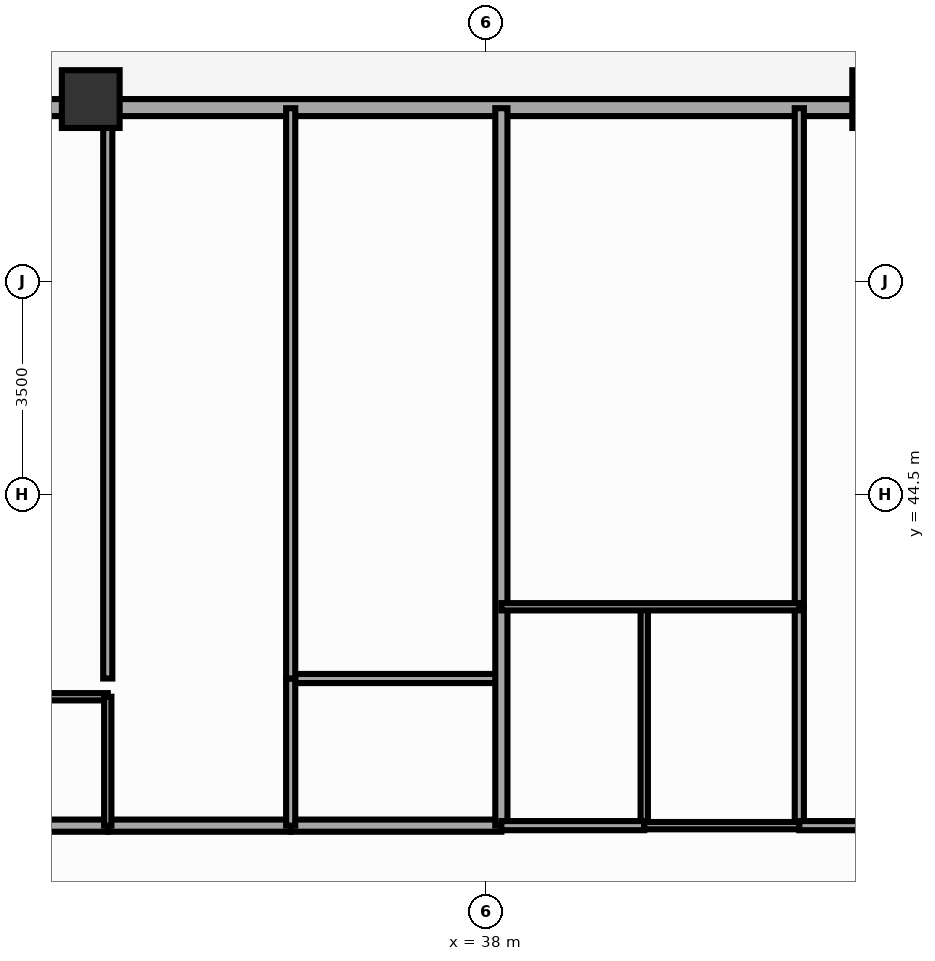
"""IFC4 building model, lengths in metres.
Left out: names, types, materials, properties, quantities, classifications, styles, units other than length and angle.
Written with IfcOpenShell. Run it as: python <this file> out.ifc"""

import sys

from ifc_helpers import new_model, si_unit, direction, frame, frame_2d, origin, origin_2d, place, context, subcontext, project, spatial, rectangle, extrude, source, transform, mapped, element, fill, save


model = new_model("IFC4")
c1 = context("Model", 3, precision=1e-05, world=origin(), true_north=direction((0.0, 1.0)))
c2 = subcontext(c1, "Body", "Model", "MODEL_VIEW")
j1 = project(units=[si_unit("LENGTHUNIT", "METRE"), si_unit("PLANEANGLEUNIT", "RADIAN")], contexts=[c1])
p1 = place(None, origin())
s1 = spatial("IfcSite", under=j1, at=p1, CompositionType="ELEMENT")
p2 = place(p1, origin())
s2 = spatial("IfcBuilding", under=s1, at=p2, CompositionType="ELEMENT")
p3 = place(p2, frame((0.0, 0.0, 74.35)))
s3 = spatial("IfcBuildingStorey", under=s2, at=p3, CompositionType="ELEMENT", Elevation=74.35)
m1 = source(origin(), c2, "Body", "SweptSolid", [
    extrude(rectangle(XDim=0.95, YDim=0.95, at=origin_2d()), origin(), (0.0, 0.0, 1.0), 3.5),
])
for number, where, z_axis, x_axis in (
    (1, (44.5, 51.0, 0.0), (0.0, 0.0, 1.0), (1.0, 0.0, 0.0)),
    (2, (31.5, 51.0, 0.0), (0.0, 0.0, 1.0), (1.0, 0.0, 0.0)),
):
    element("IfcColumn", number, at=place(p3, frame(where, z_axis=z_axis, x_axis=x_axis)), inside=s3, PredefinedType="COLUMN", context=c2, shape_type="MappedRepresentation", body=[
        mapped(m1, transform((0.0, 0.0, 0.0), scale=1.0)),
    ])
p4 = place(p3, frame((16.2, 50.86, 0.0), z_axis=(0.0, 0.0, 1.0), x_axis=(1.0, 0.0, 0.0)))
e3 = element("IfcWall", 3, at=p4, inside=s3, PredefinedType="SOLIDWALL", context=c2, shape_type="SweptSolid", body=[
    extrude(rectangle(XDim=43.6, YDim=0.28, at=frame_2d((21.8, 0.0))), origin(), (0.0, 0.0, 1.0), 2.78),
])
p5 = place(p4, frame((0.722, 0.0, 0.85)))
e4 = element("IfcOpeningElement", 4, at=p5, cuts=e3, PredefinedType="OPENING", context=c2, shape_type="SweptSolid", body=[
    extrude(rectangle(XDim=1.2, YDim=1.5, at=frame_2d((0.6, 0.75))), frame((0.0, 0.152, 0.0), z_axis=(0.0, -1.0, 0.0), x_axis=(1.0, 0.0, 0.0)), (0.0, 0.0, 1.0), 0.304),
])
p6 = place(p4, frame((3.88, 0.0, 0.85)))
e5 = element("IfcOpeningElement", 5, at=p6, cuts=e3, PredefinedType="OPENING", context=c2, shape_type="SweptSolid", body=[
    extrude(rectangle(XDim=1.8, YDim=1.65, at=frame_2d((0.9, 0.825))), frame((0.0, 0.152, 0.0), z_axis=(0.0, -1.0, 0.0), x_axis=(1.0, 0.0, 0.0)), (0.0, 0.0, 1.0), 0.304),
])
p7 = place(p4, frame((8.811, 0.0, 0.85)))
e6 = element("IfcOpeningElement", 6, at=p7, cuts=e3, PredefinedType="OPENING", context=c2, shape_type="SweptSolid", body=[
    extrude(rectangle(XDim=1.8, YDim=1.65, at=frame_2d((0.9, 0.825))), frame((0.0, 0.152, 0.0), z_axis=(0.0, -1.0, 0.0), x_axis=(1.0, 0.0, 0.0)), (0.0, 0.0, 1.0), 0.304),
])
p8 = place(p4, frame((12.688, 0.0, 0.85)))
e7 = element("IfcOpeningElement", 7, at=p8, cuts=e3, PredefinedType="OPENING", context=c2, shape_type="SweptSolid", body=[
    extrude(rectangle(XDim=1.8, YDim=1.65, at=frame_2d((0.9, 0.825))), frame((0.0, 0.152, 0.0), z_axis=(0.0, -1.0, 0.0), x_axis=(1.0, 0.0, 0.0)), (0.0, 0.0, 1.0), 0.304),
])
p9 = place(p4, frame((16.202, 0.0, 0.85)))
e8 = element("IfcOpeningElement", 8, at=p9, cuts=e3, PredefinedType="OPENING", context=c2, shape_type="SweptSolid", body=[
    extrude(rectangle(XDim=1.8, YDim=1.65, at=frame_2d((0.9, 0.825))), frame((0.0, 0.152, 0.0), z_axis=(0.0, -1.0, 0.0), x_axis=(1.0, 0.0, 0.0)), (0.0, 0.0, 1.0), 0.304),
])
p10 = place(p4, frame((19.421, 0.0, 0.85)))
e9 = element("IfcOpeningElement", 9, at=p10, cuts=e3, PredefinedType="OPENING", context=c2, shape_type="SweptSolid", body=[
    extrude(rectangle(XDim=1.8, YDim=1.65, at=frame_2d((0.9, 0.825))), frame((0.0, 0.152, 0.0), z_axis=(0.0, -1.0, 0.0), x_axis=(1.0, 0.0, 0.0)), (0.0, 0.0, 1.0), 0.304),
])
p11 = place(p4, frame((23.953, 0.0, 0.0)))
e10 = element("IfcOpeningElement", 10, at=p11, cuts=e3, PredefinedType="OPENING", context=c2, shape_type="SweptSolid", body=[
    extrude(rectangle(XDim=1.1, YDim=2.15, at=frame_2d((0.55, 1.075))), frame((0.0, 0.152, 0.0), z_axis=(0.0, -1.0, 0.0), x_axis=(1.0, 0.0, 0.0)), (0.0, 0.0, 1.0), 0.304),
])
p12 = place(p4, frame((29.776, 0.0, 0.85)))
e11 = element("IfcOpeningElement", 11, at=p12, cuts=e3, PredefinedType="OPENING", context=c2, shape_type="SweptSolid", body=[
    extrude(rectangle(XDim=1.8, YDim=1.65, at=frame_2d((0.9, 0.825))), frame((0.0, 0.152, 0.0), z_axis=(0.0, -1.0, 0.0), x_axis=(1.0, 0.0, 0.0)), (0.0, 0.0, 1.0), 0.304),
])
p13 = place(p4, frame((33.226, 0.0, 0.85)))
e12 = element("IfcOpeningElement", 12, at=p13, cuts=e3, PredefinedType="OPENING", context=c2, shape_type="SweptSolid", body=[
    extrude(rectangle(XDim=1.8, YDim=1.65, at=frame_2d((0.9, 0.825))), frame((0.0, 0.152, 0.0), z_axis=(0.0, -1.0, 0.0), x_axis=(1.0, 0.0, 0.0)), (0.0, 0.0, 1.0), 0.304),
])
p14 = place(p4, frame((36.858, 0.0, 0.85)))
e13 = element("IfcOpeningElement", 13, at=p14, cuts=e3, PredefinedType="OPENING", context=c2, shape_type="SweptSolid", body=[
    extrude(rectangle(XDim=1.8, YDim=1.65, at=frame_2d((0.9, 0.825))), frame((0.0, 0.152, 0.0), z_axis=(0.0, -1.0, 0.0), x_axis=(1.0, 0.0, 0.0)), (0.0, 0.0, 1.0), 0.304),
])
p15 = place(p4, frame((40.743, 0.0, 0.85)))
e14 = element("IfcOpeningElement", 14, at=p15, cuts=e3, PredefinedType="OPENING", context=c2, shape_type="SweptSolid", body=[
    extrude(rectangle(XDim=1.8, YDim=1.65, at=frame_2d((0.9, 0.825))), frame((0.0, 0.152, 0.0), z_axis=(0.0, -1.0, 0.0), x_axis=(1.0, 0.0, 0.0)), (0.0, 0.0, 1.0), 0.304),
])
p16 = place(p3, frame((28.392, 39.05, 0.0), z_axis=(0.0, 0.0, 1.0), x_axis=(1.0, 0.0, 0.0)))
e15 = element("IfcWall", 15, at=p16, inside=s3, PredefinedType="PARTITIONING", context=c2, shape_type="SweptSolid", body=[
    extrude(rectangle(XDim=3.388, YDim=0.2, at=frame_2d((1.694, 0.0))), origin(), (0.0, 0.0, 1.0), 3.29),
])
p17 = place(p3, frame((31.78, 39.05, 0.0), z_axis=(0.0, 0.0, 1.0), x_axis=(1.0, 0.0, 0.0)))
e16 = element("IfcWall", 16, at=p17, inside=s3, PredefinedType="PARTITIONING", context=c2, shape_type="SweptSolid", body=[
    extrude(rectangle(XDim=3.008, YDim=0.2, at=frame_2d((1.504, 0.0))), origin(), (0.0, 0.0, 1.0), 3.29),
])
p18 = place(p17, frame((1.004, 0.0, 0.0)))
e17 = element("IfcOpeningElement", 17, at=p18, cuts=e16, PredefinedType="OPENING", context=c2, shape_type="SweptSolid", body=[
    extrude(rectangle(XDim=1.0, YDim=2.15, at=frame_2d((0.5, 1.075))), frame((0.0, 0.112, 0.0), z_axis=(0.0, -1.0, 0.0), x_axis=(1.0, 0.0, 0.0)), (0.0, 0.0, 1.0), 0.224),
])
p19 = place(p3, frame((34.788, 39.05, 0.0), z_axis=(0.0, 0.0, 1.0), x_axis=(1.0, 0.0, 0.0)))
e18 = element("IfcWall", 18, at=p19, inside=s3, PredefinedType="PARTITIONING", context=c2, shape_type="SweptSolid", body=[
    extrude(rectangle(XDim=3.465, YDim=0.2, at=frame_2d((1.732, 0.0))), origin(), (0.0, 0.0, 1.0), 3.29),
])
p20 = place(p3, frame((28.392, 41.17, 0.0), z_axis=(0.0, 0.0, 1.0), x_axis=(1.0, 0.0, 0.0)))
e19 = element("IfcWall", 19, at=p20, inside=s3, PredefinedType="PARTITIONING", context=c2, shape_type="SweptSolid", body=[
    extrude(rectangle(XDim=3.388, YDim=0.12, at=frame_2d((1.694, 0.0))), origin(), (0.0, 0.0, 1.0), 3.29),
])
p21 = place(p3, frame((34.788, 41.47, 0.0), z_axis=(0.0, 0.0, 1.0), x_axis=(1.0, 0.0, 0.0)))
e20 = element("IfcWall", 20, at=p21, inside=s3, PredefinedType="PARTITIONING", context=c2, shape_type="SweptSolid", body=[
    extrude(rectangle(XDim=3.465, YDim=0.15, at=frame_2d((1.732, 0.0))), origin(), (0.0, 0.0, 1.0), 3.29),
])
p22 = place(p3, frame((31.78, 39.05, 0.0), z_axis=(0.0, 0.0, 1.0), x_axis=(0.0, 1.0, 0.0)))
e21 = element("IfcWall", 21, at=p22, inside=s3, PredefinedType="PARTITIONING", context=c2, shape_type="SweptSolid", body=[
    extrude(rectangle(XDim=2.12, YDim=0.12, at=frame_2d((1.06, 0.0))), origin(), (0.0, 0.0, 1.0), 3.29),
])
p23 = place(p22, frame((0.635, 0.0, 0.0)))
e22 = element("IfcOpeningElement", 22, at=p23, cuts=e21, PredefinedType="OPENING", context=c2, shape_type="SweptSolid", body=[
    extrude(rectangle(XDim=0.85, YDim=2.05, at=frame_2d((0.425, 1.025))), frame((0.0, 0.072, 0.0), z_axis=(0.0, -1.0, 0.0), x_axis=(1.0, 0.0, 0.0)), (0.0, 0.0, 1.0), 0.144),
])
p24 = place(p3, frame((31.78, 41.47, 0.0), z_axis=(0.0, 0.0, 1.0), x_axis=(0.0, 1.0, 0.0)))
e23 = element("IfcWall", 23, at=p24, inside=s3, PredefinedType="PARTITIONING", context=c2, shape_type="SweptSolid", body=[
    extrude(rectangle(XDim=9.38, YDim=0.15, at=frame_2d((4.69, 0.0))), origin(), (0.0, 0.0, 1.0), 3.29),
])
p25 = place(p24, frame((3.907, 0.0, 0.0)))
e24 = element("IfcOpeningElement", 24, at=p25, cuts=e23, PredefinedType="OPENING", context=c2, shape_type="SweptSolid", body=[
    extrude(rectangle(XDim=0.9, YDim=2.1, at=frame_2d((0.45, 1.05))), frame((0.0, 0.087, 0.0), z_axis=(0.0, -1.0, 0.0), x_axis=(1.0, 0.0, 0.0)), (0.0, 0.0, 1.0), 0.174),
])
p26 = place(p3, frame((34.788, 39.05, 0.0), z_axis=(0.0, 0.0, 1.0), x_axis=(0.0, 1.0, 0.0)))
e25 = element("IfcWall", 25, at=p26, inside=s3, PredefinedType="PARTITIONING", context=c2, shape_type="SweptSolid", body=[
    extrude(rectangle(XDim=2.42, YDim=0.15, at=frame_2d((1.21, 0.0))), origin(), (0.0, 0.0, 1.0), 3.29),
])
p27 = place(p26, frame((0.76, 0.0, 0.0)))
e26 = element("IfcOpeningElement", 26, at=p27, cuts=e25, PredefinedType="OPENING", context=c2, shape_type="SweptSolid", body=[
    extrude(rectangle(XDim=0.9, YDim=2.1, at=frame_2d((0.45, 1.05))), frame((0.0, 0.087, 0.0), z_axis=(0.0, -1.0, 0.0), x_axis=(1.0, 0.0, 0.0)), (0.0, 0.0, 1.0), 0.174),
])
p28 = place(p3, frame((34.788, 41.47, 0.0), z_axis=(0.0, 0.0, 1.0), x_axis=(0.0, 1.0, 0.0)))
e27 = element("IfcWall", 27, at=p28, inside=s3, PredefinedType="PARTITIONING", context=c2, shape_type="SweptSolid", body=[
    extrude(rectangle(XDim=9.38, YDim=0.15, at=frame_2d((4.69, 0.0))), origin(), (0.0, 0.0, 1.0), 3.29),
])
p29 = place(p28, frame((3.907, 0.0, 0.0)))
e28 = element("IfcOpeningElement", 28, at=p29, cuts=e27, PredefinedType="OPENING", context=c2, shape_type="SweptSolid", body=[
    extrude(rectangle(XDim=0.9, YDim=2.1, at=frame_2d((0.45, 1.05))), frame((0.0, 0.087, 0.0), z_axis=(0.0, -1.0, 0.0), x_axis=(1.0, 0.0, 0.0)), (0.0, 0.0, 1.0), 0.174),
])
p30 = place(p3, frame((38.253, 39.05, 0.0), z_axis=(0.0, 0.0, 1.0), x_axis=(0.0, 1.0, 0.0)))
e29 = element("IfcWall", 29, at=p30, inside=s3, PredefinedType="PARTITIONING", context=c2, shape_type="SweptSolid", body=[
    extrude(rectangle(XDim=11.8, YDim=0.2, at=frame_2d((5.9, 0.0))), origin(), (0.0, 0.0, 1.0), 3.29),
])
p31 = place(p3, frame((40.603, 39.05, 0.0), z_axis=(0.0, 0.0, 1.0), x_axis=(0.0, 1.0, 0.0)))
e30 = element("IfcWall", 30, at=p31, inside=s3, PredefinedType="PARTITIONING", context=c2, shape_type="SweptSolid", body=[
    extrude(rectangle(XDim=3.6, YDim=0.12, at=frame_2d((1.8, 0.0))), origin(), (0.0, 0.0, 1.0), 3.29),
])
p32 = place(p3, frame((43.153, 39.05, 0.0), z_axis=(0.0, 0.0, 1.0), x_axis=(0.0, 1.0, 0.0)))
e31 = element("IfcWall", 31, at=p32, inside=s3, PredefinedType="PARTITIONING", context=c2, shape_type="SweptSolid", body=[
    extrude(rectangle(XDim=3.6, YDim=0.15, at=frame_2d((1.8, 0.0))), origin(), (0.0, 0.0, 1.0), 3.29),
])
p33 = place(p3, frame((43.153, 42.65, 0.0), z_axis=(0.0, 0.0, 1.0), x_axis=(0.0, 1.0, 0.0)))
e32 = element("IfcWall", 32, at=p33, inside=s3, PredefinedType="PARTITIONING", context=c2, shape_type="SweptSolid", body=[
    extrude(rectangle(XDim=8.2, YDim=0.15, at=frame_2d((4.1, 0.0))), origin(), (0.0, 0.0, 1.0), 3.29),
])
p34 = place(p33, frame((3.65, 0.0, 0.0)))
e33 = element("IfcOpeningElement", 33, at=p34, cuts=e32, PredefinedType="OPENING", context=c2, shape_type="SweptSolid", body=[
    extrude(rectangle(XDim=0.9, YDim=2.1, at=frame_2d((0.45, 1.05))), frame((0.0, 0.087, 0.0), z_axis=(0.0, -1.0, 0.0), x_axis=(1.0, 0.0, 0.0)), (0.0, 0.0, 1.0), 0.174),
])
p35 = place(p3, frame((38.253, 42.65, 0.0), z_axis=(0.0, 0.0, 1.0), x_axis=(1.0, 0.0, 0.0)))
e34 = element("IfcWall", 34, at=p35, inside=s3, PredefinedType="PARTITIONING", context=c2, shape_type="SweptSolid", body=[
    extrude(rectangle(XDim=4.9, YDim=0.12, at=frame_2d((2.45, 0.0))), origin(), (0.0, 0.0, 1.0), 3.29),
])
p36 = place(p3, frame((38.253, 39.05, 0.0), z_axis=(0.0, 0.0, 1.0), x_axis=(1.0, 0.0, 0.0)))
e35 = element("IfcWall", 35, at=p36, inside=s3, PredefinedType="PARTITIONING", context=c2, shape_type="SweptSolid", body=[
    extrude(rectangle(XDim=2.35, YDim=0.15, at=frame_2d((1.175, 0.0))), origin(), (0.0, 0.0, 1.0), 3.29),
])
p37 = place(p36, frame((0.725, 0.0, 0.0)))
e36 = element("IfcOpeningElement", 36, at=p37, cuts=e35, PredefinedType="OPENING", context=c2, shape_type="SweptSolid", body=[
    extrude(rectangle(XDim=0.9, YDim=2.1, at=frame_2d((0.45, 1.05))), frame((0.0, 0.087, 0.0), z_axis=(0.0, -1.0, 0.0), x_axis=(1.0, 0.0, 0.0)), (0.0, 0.0, 1.0), 0.174),
])
p38 = place(p3, frame((40.603, 39.05, 0.0), z_axis=(0.0, 0.0, 1.0), x_axis=(1.0, 0.0, 0.0)))
e37 = element("IfcWall", 37, at=p38, inside=s3, PredefinedType="PARTITIONING", context=c2, shape_type="SweptSolid", body=[
    extrude(rectangle(XDim=2.55, YDim=0.12, at=frame_2d((1.275, 0.0))), origin(), (0.0, 0.0, 1.0), 3.29),
])
p39 = place(p38, frame((0.775, 0.0, 0.0)))
e38 = element("IfcOpeningElement", 38, at=p39, cuts=e37, PredefinedType="OPENING", context=c2, shape_type="SweptSolid", body=[
    extrude(rectangle(XDim=1.0, YDim=2.1, at=frame_2d((0.5, 1.05))), frame((0.0, 0.072, 0.0), z_axis=(0.0, -1.0, 0.0), x_axis=(1.0, 0.0, 0.0)), (0.0, 0.0, 1.0), 0.144),
])
p40 = place(p3, frame((43.153, 39.05, 0.0), z_axis=(0.0, 0.0, 1.0), x_axis=(1.0, 0.0, 0.0)))
e39 = element("IfcWall", 39, at=p40, inside=s3, PredefinedType="PARTITIONING", context=c2, shape_type="SweptSolid", body=[
    extrude(rectangle(XDim=5.783, YDim=0.15, at=frame_2d((2.892, 0.0))), origin(), (0.0, 0.0, 1.0), 3.29),
])
p41 = place(p40, frame((2.515, 0.0, 0.0)))
e40 = element("IfcOpeningElement", 40, at=p41, cuts=e39, PredefinedType="OPENING", context=c2, shape_type="SweptSolid", body=[
    extrude(rectangle(XDim=1.1, YDim=2.15, at=frame_2d((0.55, 1.075))), frame((0.0, 0.087, 0.0), z_axis=(0.0, -1.0, 0.0), x_axis=(1.0, 0.0, 0.0)), (0.0, 0.0, 1.0), 0.174),
])
m2 = source(origin(), c2, "Body", "SweptSolid", [
    extrude(rectangle(XDim=1.8, YDim=1.65, at=frame_2d((0.9, 0.825))), frame((0.0, 0.03, 0.0), z_axis=(0.0, -1.0, 0.0), x_axis=(1.0, 0.0, 0.0)), (0.0, 0.0, 1.0), 0.06),
])
p42 = place(p9, origin())
e41 = element("IfcWindow", 41, at=p42, inside=s3, PartitioningType="SINGLE_PANEL", PredefinedType="WINDOW", context=c2, shape_type="MappedRepresentation", body=[
    mapped(m2, transform((0.0, 0.0, 0.0), scale=1.0)),
])
fill(e8, e41)
p43 = place(p10, origin())
e42 = element("IfcWindow", 42, at=p43, inside=s3, PartitioningType="SINGLE_PANEL", PredefinedType="WINDOW", context=c2, shape_type="MappedRepresentation", body=[
    mapped(m2, transform((0.0, 0.0, 0.0), scale=1.0)),
])
fill(e9, e42)
m3 = source(origin(), c2, "Body", "SweptSolid", [
    extrude(rectangle(XDim=1.1, YDim=2.15, at=frame_2d((0.55, 1.075))), frame((0.0, 0.025, 0.0), z_axis=(0.0, -1.0, 0.0), x_axis=(1.0, 0.0, 0.0)), (0.0, 0.0, 1.0), 0.05),
])
p44 = place(p11, origin())
e43 = element("IfcDoor", 43, at=p44, inside=s3, OperationType="SINGLE_SWING_LEFT", PredefinedType="DOOR", context=c2, shape_type="MappedRepresentation", body=[
    mapped(m3, transform((0.0, 0.0, 0.0), scale=1.0)),
])
fill(e10, e43)
m4 = source(origin(), c2, "Body", "SweptSolid", [
    extrude(rectangle(XDim=1.0, YDim=2.15, at=frame_2d((0.5, 1.075))), frame((0.0, 0.025, 0.0), z_axis=(0.0, -1.0, 0.0), x_axis=(1.0, 0.0, 0.0)), (0.0, 0.0, 1.0), 0.05),
])
p45 = place(p18, origin())
e44 = element("IfcDoor", 44, at=p45, inside=s3, OperationType="SINGLE_SWING_LEFT", PredefinedType="DOOR", context=c2, shape_type="MappedRepresentation", body=[
    mapped(m4, transform((0.0, 0.0, 0.0), scale=1.0)),
])
fill(e17, e44)
m5 = source(origin(), c2, "Body", "SweptSolid", [
    extrude(rectangle(XDim=0.85, YDim=2.05, at=frame_2d((0.425, 1.025))), frame((0.0, 0.025, 0.0), z_axis=(0.0, -1.0, 0.0), x_axis=(1.0, 0.0, 0.0)), (0.0, 0.0, 1.0), 0.05),
])
p46 = place(p23, origin())
e45 = element("IfcDoor", 45, at=p46, inside=s3, OperationType="SINGLE_SWING_RIGHT", PredefinedType="DOOR", context=c2, shape_type="MappedRepresentation", body=[
    mapped(m5, transform((0.0, 0.0, 0.0), scale=1.0)),
])
fill(e22, e45)
m6 = source(origin(), c2, "Body", "SweptSolid", [
    extrude(rectangle(XDim=0.9, YDim=2.1, at=frame_2d((0.45, 1.05))), frame((0.0, 0.025, 0.0), z_axis=(0.0, -1.0, 0.0), x_axis=(1.0, 0.0, 0.0)), (0.0, 0.0, 1.0), 0.05),
])
p47 = place(p25, origin())
e46 = element("IfcDoor", 46, at=p47, inside=s3, OperationType="SINGLE_SWING_LEFT", PredefinedType="DOOR", context=c2, shape_type="MappedRepresentation", body=[
    mapped(m6, transform((0.0, 0.0, 0.0), scale=1.0)),
])
fill(e24, e46)
p48 = place(p27, origin())
e47 = element("IfcDoor", 47, at=p48, inside=s3, OperationType="SINGLE_SWING_RIGHT", PredefinedType="DOOR", context=c2, shape_type="MappedRepresentation", body=[
    mapped(m6, transform((0.0, 0.0, 0.0), scale=1.0)),
])
fill(e26, e47)
p49 = place(p29, origin())
e48 = element("IfcDoor", 48, at=p49, inside=s3, OperationType="SINGLE_SWING_LEFT", PredefinedType="DOOR", context=c2, shape_type="MappedRepresentation", body=[
    mapped(m6, transform((0.0, 0.0, 0.0), scale=1.0)),
])
fill(e28, e48)
p50 = place(p34, origin())
e49 = element("IfcDoor", 49, at=p50, inside=s3, OperationType="SINGLE_SWING_RIGHT", PredefinedType="DOOR", context=c2, shape_type="MappedRepresentation", body=[
    mapped(m6, transform((0.0, 0.0, 0.0), scale=1.0)),
])
fill(e33, e49)
p51 = place(p37, origin())
e50 = element("IfcDoor", 50, at=p51, inside=s3, OperationType="SINGLE_SWING_LEFT", PredefinedType="DOOR", context=c2, shape_type="MappedRepresentation", body=[
    mapped(m6, transform((0.0, 0.0, 0.0), scale=1.0)),
])
fill(e36, e50)
m7 = source(origin(), c2, "Body", "SweptSolid", [
    extrude(rectangle(XDim=1.0, YDim=2.1, at=frame_2d((0.5, 1.05))), frame((0.0, 0.025, 0.0), z_axis=(0.0, -1.0, 0.0), x_axis=(1.0, 0.0, 0.0)), (0.0, 0.0, 1.0), 0.05),
])
p52 = place(p39, origin())
e51 = element("IfcDoor", 51, at=p52, inside=s3, OperationType="SINGLE_SWING_RIGHT", PredefinedType="DOOR", context=c2, shape_type="MappedRepresentation", body=[
    mapped(m7, transform((0.0, 0.0, 0.0), scale=1.0)),
])
fill(e38, e51)
save(model, sys.argv[1])
